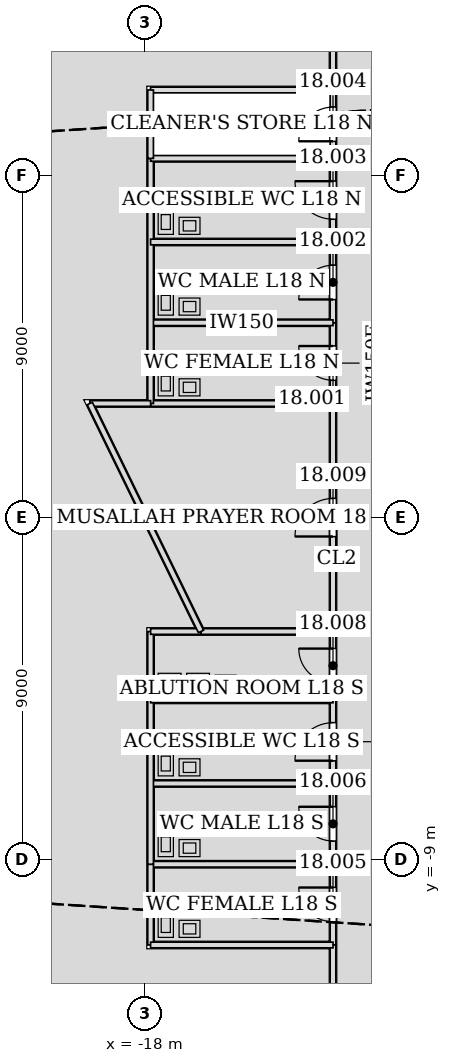
"""IFC4 building model, lengths in metres.
Left out: names, types, materials, properties, quantities, classifications, styles, units other than length and angle.
Written with IfcOpenShell. Run it as: python <this file> out.ifc"""

import sys

from ifc_helpers import new_model, si_unit, direction, frame, frame_2d, origin, place, context, subcontext, project, spatial, rectangle, extrude, element, fill, save


model = new_model("IFC4")
c1 = context("Model", 3, precision=1e-05, world=origin(), true_north=direction((0.0, 1.0)))
c2 = subcontext(c1, "Body", "Model", "MODEL_VIEW")
j1 = project(units=[si_unit("LENGTHUNIT", "METRE"), si_unit("PLANEANGLEUNIT", "RADIAN")], contexts=[c1])
p1 = place(None, origin())
s1 = spatial("IfcSite", under=j1, at=p1, CompositionType="ELEMENT")
p2 = place(p1, origin())
s2 = spatial("IfcBuilding", under=s1, at=p2, CompositionType="ELEMENT")
p3 = place(p2, frame((0.0, 0.0, 83.4)))
s3 = spatial("IfcBuildingStorey", under=s2, at=p3, CompositionType="ELEMENT", Elevation=83.4)
p4 = place(p3, frame((-13.05, 5.126, 0.0), z_axis=(0.0, 0.0, 1.0), x_axis=(0.0, -1.0, 0.0)))
e1 = element("IfcWall", 1, at=p4, inside=s3, PredefinedType="PARTITIONING", context=c2, shape_type="SweptSolid", body=[
    extrude(rectangle(XDim=2.127, YDim=0.15, at=frame_2d((1.063, 0.0))), origin(), (0.0, 0.0, 1.0), 4.035),
])
p5 = place(p4, frame((0.614, 0.0, 0.0)))
e2 = element("IfcOpeningElement", 2, at=p5, cuts=e1, PredefinedType="OPENING", context=c2, shape_type="SweptSolid", body=[
    extrude(rectangle(XDim=0.9, YDim=2.1, at=frame_2d((0.45, 1.05))), frame((0.0, 0.085, 0.0), z_axis=(0.0, -1.0, 0.0), x_axis=(1.0, 0.0, 0.0)), (0.0, 0.0, 1.0), 0.17),
])
p6 = place(p3, frame((-13.05, 7.251, 0.0), z_axis=(0.0, 0.0, 1.0), x_axis=(0.0, -1.0, 0.0)))
e3 = element("IfcWall", 3, at=p6, inside=s3, PredefinedType="PARTITIONING", context=c2, shape_type="SweptSolid", body=[
    extrude(rectangle(XDim=2.127, YDim=0.15, at=frame_2d((1.063, 0.0))), origin(), (0.0, 0.0, 1.0), 4.035),
])
p7 = place(p6, frame((0.614, 0.0, 0.0)))
e4 = element("IfcOpeningElement", 4, at=p7, cuts=e3, PredefinedType="OPENING", context=c2, shape_type="SweptSolid", body=[
    extrude(rectangle(XDim=0.9, YDim=2.1, at=frame_2d((0.45, 1.05))), frame((0.0, 0.085, 0.0), z_axis=(0.0, -1.0, 0.0), x_axis=(1.0, 0.0, 0.0)), (0.0, 0.0, 1.0), 0.17),
])
p8 = place(p3, frame((-13.05, 9.451, 0.0), z_axis=(0.0, 0.0, 1.0), x_axis=(0.0, -1.0, 0.0)))
e5 = element("IfcWall", 5, at=p8, inside=s3, PredefinedType="PARTITIONING", context=c2, shape_type="SweptSolid", body=[
    extrude(rectangle(XDim=2.202, YDim=0.15, at=frame_2d((1.101, 0.0))), origin(), (0.0, 0.0, 1.0), 4.035),
])
p9 = place(p8, frame((0.601, 0.0, 0.0)))
e6 = element("IfcOpeningElement", 6, at=p9, cuts=e5, PredefinedType="OPENING", context=c2, shape_type="SweptSolid", body=[
    extrude(rectangle(XDim=1.0, YDim=2.1, at=frame_2d((0.5, 1.05))), frame((0.0, 0.085, 0.0), z_axis=(0.0, -1.0, 0.0), x_axis=(1.0, 0.0, 0.0)), (0.0, 0.0, 1.0), 0.17),
])
p10 = place(p3, frame((-13.05, 11.251, 0.0), z_axis=(0.0, 0.0, 1.0), x_axis=(0.0, -1.0, 0.0)))
e7 = element("IfcWall", 7, at=p10, inside=s3, PredefinedType="PARTITIONING", context=c2, shape_type="SweptSolid", body=[
    extrude(rectangle(XDim=1.802, YDim=0.15, at=frame_2d((0.901, 0.0))), origin(), (0.0, 0.0, 1.0), 3.014),
])
p11 = place(p10, frame((0.451, 0.0, 0.0)))
e8 = element("IfcOpeningElement", 8, at=p11, cuts=e7, PredefinedType="OPENING", context=c2, shape_type="SweptSolid", body=[
    extrude(rectangle(XDim=0.9, YDim=2.1, at=frame_2d((0.45, 1.05))), frame((0.0, 0.085, 0.0), z_axis=(0.0, -1.0, 0.0), x_axis=(1.0, 0.0, 0.0)), (0.0, 0.0, 1.0), 0.17),
])
p12 = place(p3, frame((-13.05, -9.124, 0.0), z_axis=(0.0, 0.0, 1.0), x_axis=(0.0, -1.0, 0.0)))
e9 = element("IfcWall", 9, at=p12, inside=s3, PredefinedType="PARTITIONING", context=c2, shape_type="SweptSolid", body=[
    extrude(rectangle(XDim=2.127, YDim=0.15, at=frame_2d((1.063, 0.0))), origin(), (0.0, 0.0, 1.0), 3.014),
])
p13 = place(p12, frame((0.614, 0.0, 0.0)))
e10 = element("IfcOpeningElement", 10, at=p13, cuts=e9, PredefinedType="OPENING", context=c2, shape_type="SweptSolid", body=[
    extrude(rectangle(XDim=0.9, YDim=2.1, at=frame_2d((0.45, 1.05))), frame((0.0, 0.085, 0.0), z_axis=(0.0, -1.0, 0.0), x_axis=(1.0, 0.0, 0.0)), (0.0, 0.0, 1.0), 0.17),
])
p14 = place(p3, frame((-13.05, -6.999, 0.0), z_axis=(0.0, 0.0, 1.0), x_axis=(0.0, -1.0, 0.0)))
e11 = element("IfcWall", 11, at=p14, inside=s3, PredefinedType="PARTITIONING", context=c2, shape_type="SweptSolid", body=[
    extrude(rectangle(XDim=2.127, YDim=0.15, at=frame_2d((1.063, 0.0))), origin(), (0.0, 0.0, 1.0), 4.035),
])
p15 = place(p14, frame((0.614, 0.0, 0.0)))
e12 = element("IfcOpeningElement", 12, at=p15, cuts=e11, PredefinedType="OPENING", context=c2, shape_type="SweptSolid", body=[
    extrude(rectangle(XDim=0.9, YDim=2.1, at=frame_2d((0.45, 1.05))), frame((0.0, 0.085, 0.0), z_axis=(0.0, -1.0, 0.0), x_axis=(1.0, 0.0, 0.0)), (0.0, 0.0, 1.0), 0.17),
])
p16 = place(p3, frame((-13.05, -4.799, 0.0), z_axis=(0.0, 0.0, 1.0), x_axis=(0.0, -1.0, 0.0)))
e13 = element("IfcWall", 13, at=p16, inside=s3, PredefinedType="PARTITIONING", context=c2, shape_type="SweptSolid", body=[
    extrude(rectangle(XDim=2.202, YDim=0.15, at=frame_2d((1.101, 0.0))), origin(), (0.0, 0.0, 1.0), 4.035),
])
p17 = place(p16, frame((0.601, 0.0, 0.0)))
e14 = element("IfcOpeningElement", 14, at=p17, cuts=e13, PredefinedType="OPENING", context=c2, shape_type="SweptSolid", body=[
    extrude(rectangle(XDim=1.0, YDim=2.1, at=frame_2d((0.5, 1.05))), frame((0.0, 0.085, 0.0), z_axis=(0.0, -1.0, 0.0), x_axis=(1.0, 0.0, 0.0)), (0.0, 0.0, 1.0), 0.17),
])
p18 = place(p3, frame((-13.05, -2.999, 0.0), z_axis=(0.0, 0.0, 1.0), x_axis=(0.0, -1.0, 0.0)))
e15 = element("IfcWall", 15, at=p18, inside=s3, PredefinedType="PARTITIONING", context=c2, shape_type="SweptSolid", body=[
    extrude(rectangle(XDim=1.802, YDim=0.15, at=frame_2d((0.901, 0.0))), origin(), (0.0, 0.0, 1.0), 4.035),
])
p19 = place(p18, frame((0.451, 0.0, 0.0)))
e16 = element("IfcOpeningElement", 16, at=p19, cuts=e15, PredefinedType="OPENING", context=c2, shape_type="SweptSolid", body=[
    extrude(rectangle(XDim=0.9, YDim=2.1, at=frame_2d((0.45, 1.05))), frame((0.0, 0.085, 0.0), z_axis=(0.0, -1.0, 0.0), x_axis=(1.0, 0.0, 0.0)), (0.0, 0.0, 1.0), 0.17),
])
p20 = place(p3, frame((-13.05, 3.001, 0.0), z_axis=(0.0, 0.0, 1.0), x_axis=(0.0, -1.0, 0.0)))
e17 = element("IfcWall", 17, at=p20, inside=s3, PredefinedType="PARTITIONING", context=c2, shape_type="SweptSolid", body=[
    extrude(rectangle(XDim=6.002, YDim=0.15, at=frame_2d((3.001, 0.0))), origin(), (0.0, 0.0, 1.0), 3.065),
])
p21 = place(p20, frame((2.501, 0.0, 0.0)))
e18 = element("IfcOpeningElement", 18, at=p21, cuts=e17, PredefinedType="OPENING", context=c2, shape_type="SweptSolid", body=[
    extrude(rectangle(XDim=1.0, YDim=2.1, at=frame_2d((0.5, 1.05))), frame((0.0, 0.085, 0.0), z_axis=(0.0, -1.0, 0.0), x_axis=(1.0, 0.0, 0.0)), (0.0, 0.0, 1.0), 0.17),
])
for number, where, z_axis, x_axis in (
    (19, (-13.05, -11.249, 0.0), (0.0, 0.0, 1.0), (0.0, -1.0, 0.0)),
    (20, (-13.05, 13.05, 0.0), (0.0, 0.0, 1.0), (0.0, -1.0, 0.0)),
):
    element("IfcWall", number, at=place(p3, frame(where, z_axis=z_axis, x_axis=x_axis)), inside=s3, PredefinedType="PARTITIONING", context=c2, shape_type="SweptSolid", body=[
        extrude(rectangle(XDim=1.801, YDim=0.15, at=frame_2d((0.9, 0.0))), origin(), (0.0, 0.0, 1.0), 3.113),
    ])
for number, where, z_axis, x_axis in (
    (21, (-13.05, 5.125, 0.0), (0.0, 0.0, 1.0), (-1.0, 0.0, 0.0)),
    (22, (-17.85, 3.0, 0.0), (0.0, 0.0, 1.0), (1.0, 0.0, 0.0)),
):
    element("IfcWall", number, at=place(p3, frame(where, z_axis=z_axis, x_axis=x_axis)), inside=s3, PredefinedType="PARTITIONING", context=c2, shape_type="SweptSolid", body=[
        extrude(rectangle(XDim=4.8, YDim=0.15, at=frame_2d((2.4, 0.0))), origin(), (0.0, 0.0, 1.0), 3.492),
    ])
p22 = place(p3, frame((-17.85, 3.0, 0.0), z_axis=(0.0, 0.0, 1.0), x_axis=(0.0, 1.0, 0.0)))
e23 = element("IfcWall", 23, at=p22, inside=s3, PredefinedType="PARTITIONING", context=c2, shape_type="SweptSolid", body=[
    extrude(rectangle(XDim=6.45, YDim=0.15, at=frame_2d((3.225, 0.0))), origin(), (0.0, 0.0, 1.0), 4.035),
])
for number, where, z_axis, x_axis in (
    (24, (-13.05, 7.25, 0.0), (0.0, 0.0, 1.0), (-1.0, 0.0, 0.0)),
    (25, (-13.05, 9.45, 0.0), (0.0, 0.0, 1.0), (-1.0, 0.0, 0.0)),
):
    element("IfcWall", number, at=place(p3, frame(where, z_axis=z_axis, x_axis=x_axis)), inside=s3, PredefinedType="PARTITIONING", context=c2, shape_type="SweptSolid", body=[
        extrude(rectangle(XDim=4.8, YDim=0.15, at=frame_2d((2.4, 0.0))), origin(), (0.0, 0.0, 1.0), 3.492),
    ])
p23 = place(p3, frame((-13.05, 11.25, 0.0), z_axis=(0.0, 0.0, 1.0), x_axis=(-1.0, 0.0, 0.0)))
e26 = element("IfcWall", 26, at=p23, inside=s3, PredefinedType="PARTITIONING", context=c2, shape_type="SweptSolid", body=[
    extrude(rectangle(XDim=4.8, YDim=0.15, at=frame_2d((2.4, 0.0))), origin(), (0.0, 0.0, 1.0), 3.715),
])
p24 = place(p3, frame((-17.85, 11.25, 0.0), z_axis=(0.0, 0.0, 1.0), x_axis=(0.0, -1.0, 0.0)))
e27 = element("IfcWall", 27, at=p24, inside=s3, PredefinedType="PARTITIONING", context=c2, shape_type="SweptSolid", body=[
    extrude(rectangle(XDim=1.8, YDim=0.15, at=frame_2d((0.9, 0.0))), origin(), (0.0, 0.0, 1.0), 3.014),
])
p25 = place(p3, frame((-13.05, -9.125, 0.0), z_axis=(0.0, 0.0, 1.0), x_axis=(-1.0, 0.0, 0.0)))
e28 = element("IfcWall", 28, at=p25, inside=s3, PredefinedType="PARTITIONING", context=c2, shape_type="SweptSolid", body=[
    extrude(rectangle(XDim=4.8, YDim=0.15, at=frame_2d((2.4, 0.0))), origin(), (0.0, 0.0, 1.0), 3.492),
])
p26 = place(p3, frame((-17.85, -9.125, 0.0), z_axis=(0.0, 0.0, 1.0), x_axis=(0.0, -1.0, 0.0)))
e29 = element("IfcWall", 29, at=p26, inside=s3, PredefinedType="PARTITIONING", context=c2, shape_type="SweptSolid", body=[
    extrude(rectangle(XDim=2.125, YDim=0.15, at=frame_2d((1.062, 0.0))), origin(), (0.0, 0.0, 1.0), 3.014),
])
p27 = place(p3, frame((-17.85, -11.25, 0.0), z_axis=(0.0, 0.0, 1.0), x_axis=(1.0, 0.0, 0.0)))
e30 = element("IfcWall", 30, at=p27, inside=s3, PredefinedType="PARTITIONING", context=c2, shape_type="SweptSolid", body=[
    extrude(rectangle(XDim=4.8, YDim=0.15, at=frame_2d((2.4, 0.0))), origin(), (0.0, 0.0, 1.0), 3.715),
])
p28 = place(p3, frame((-13.05, -7.0, 0.0), z_axis=(0.0, 0.0, 1.0), x_axis=(-1.0, 0.0, 0.0)))
e31 = element("IfcWall", 31, at=p28, inside=s3, PredefinedType="PARTITIONING", context=c2, shape_type="SweptSolid", body=[
    extrude(rectangle(XDim=4.8, YDim=0.15, at=frame_2d((2.4, 0.0))), origin(), (0.0, 0.0, 1.0), 3.492),
])
p29 = place(p3, frame((-17.85, -9.125, 0.0), z_axis=(0.0, 0.0, 1.0), x_axis=(0.0, 1.0, 0.0)))
e32 = element("IfcWall", 32, at=p29, inside=s3, PredefinedType="PARTITIONING", context=c2, shape_type="SweptSolid", body=[
    extrude(rectangle(XDim=6.125, YDim=0.15, at=frame_2d((3.062, 0.0))), origin(), (0.0, 0.0, 1.0), 4.035),
])
p30 = place(p3, frame((-13.05, -4.8, 0.0), z_axis=(0.0, 0.0, 1.0), x_axis=(-1.0, 0.0, 0.0)))
e33 = element("IfcWall", 33, at=p30, inside=s3, PredefinedType="PARTITIONING", context=c2, shape_type="SweptSolid", body=[
    extrude(rectangle(XDim=4.8, YDim=0.15, at=frame_2d((2.4, 0.0))), origin(), (0.0, 0.0, 1.0), 3.492),
])
p31 = place(p3, frame((-13.05, -3.0, 0.0), z_axis=(0.0, 0.0, 1.0), x_axis=(-1.0, 0.0, 0.0)))
e34 = element("IfcWall", 34, at=p31, inside=s3, PredefinedType="PARTITIONING", context=c2, shape_type="SweptSolid", body=[
    extrude(rectangle(XDim=3.475, YDim=0.15, at=frame_2d((1.737, 0.0))), origin(), (0.0, 0.0, 1.0), 3.492),
])
p32 = place(p3, frame((-16.522, -3.0, 0.0), z_axis=(0.0, 0.0, 1.0), x_axis=(-1.0, 0.0, 0.0)))
e35 = element("IfcWall", 35, at=p32, inside=s3, PredefinedType="PARTITIONING", context=c2, shape_type="SweptSolid", body=[
    extrude(rectangle(XDim=1.328, YDim=0.15, at=frame_2d((0.664, 0.0))), origin(), (0.0, 0.0, 1.0), 4.035),
])
p33 = place(p3, frame((-17.849, 3.0, 0.0), z_axis=(0.0, 0.0, 1.0), x_axis=(-1.0, 0.0, 0.0)))
e36 = element("IfcWall", 36, at=p33, inside=s3, PredefinedType="PARTITIONING", context=c2, shape_type="SweptSolid", body=[
    extrude(rectangle(XDim=1.601, YDim=0.15, at=frame_2d((0.8, 0.0))), origin(), (0.0, 0.0, 1.0), 3.497),
])
p34 = place(p3, frame((-19.45, 3.0, 0.0), z_axis=(0.0, 0.0, 1.0), x_axis=(0.43835589904, -0.898801482963, 0.0)))
e37 = element("IfcWall", 37, at=p34, inside=s3, PredefinedType="PARTITIONING", context=c2, shape_type="SweptSolid", body=[
    extrude(rectangle(XDim=6.676, YDim=0.15, at=frame_2d((3.338, 0.0))), origin(), (0.0, 0.0, 1.0), 3.065),
])
p35 = place(p5, frame((0.9, 0.0, 0.0), z_axis=(0.0, 0.0, 1.0), x_axis=(-1.0, 0.0, 0.0)))
e38 = element("IfcDoor", 38, at=p35, inside=s3, OperationType="SINGLE_SWING_RIGHT", PredefinedType="DOOR", context=c2, shape_type="SweptSolid", body=[
    extrude(rectangle(XDim=0.9, YDim=2.1, at=frame_2d((0.45, 1.05))), frame((0.0, 0.025, 0.0), z_axis=(0.0, -1.0, 0.0), x_axis=(1.0, 0.0, 0.0)), (0.0, 0.0, 1.0), 0.05),
])
fill(e2, e38)
p36 = place(p7, frame((0.9, 0.0, 0.0), z_axis=(0.0, 0.0, 1.0), x_axis=(-1.0, 0.0, 0.0)))
e39 = element("IfcDoor", 39, at=p36, inside=s3, OperationType="SINGLE_SWING_LEFT", PredefinedType="DOOR", context=c2, shape_type="SweptSolid", body=[
    extrude(rectangle(XDim=0.9, YDim=2.1, at=frame_2d((0.45, 1.05))), frame((0.0, 0.025, 0.0), z_axis=(0.0, -1.0, 0.0), x_axis=(1.0, 0.0, 0.0)), (0.0, 0.0, 1.0), 0.05),
])
fill(e4, e39)
p37 = place(p9, frame((1.0, 0.0, 0.0), z_axis=(0.0, 0.0, 1.0), x_axis=(-1.0, 0.0, 0.0)))
e40 = element("IfcDoor", 40, at=p37, inside=s3, OperationType="SINGLE_SWING_RIGHT", PredefinedType="DOOR", context=c2, shape_type="SweptSolid", body=[
    extrude(rectangle(XDim=1.0, YDim=2.1, at=frame_2d((0.5, 1.05))), frame((0.0, 0.025, 0.0), z_axis=(0.0, -1.0, 0.0), x_axis=(1.0, 0.0, 0.0)), (0.0, 0.0, 1.0), 0.05),
])
fill(e6, e40)
p38 = place(p11, frame((0.9, 0.0, 0.0), z_axis=(0.0, 0.0, 1.0), x_axis=(-1.0, 0.0, 0.0)))
e41 = element("IfcDoor", 41, at=p38, inside=s3, OperationType="SINGLE_SWING_LEFT", PredefinedType="DOOR", context=c2, shape_type="SweptSolid", body=[
    extrude(rectangle(XDim=0.9, YDim=2.1, at=frame_2d((0.45, 1.05))), frame((0.0, 0.025, 0.0), z_axis=(0.0, -1.0, 0.0), x_axis=(1.0, 0.0, 0.0)), (0.0, 0.0, 1.0), 0.05),
])
fill(e8, e41)
p39 = place(p13, frame((0.9, 0.0, 0.0), z_axis=(0.0, 0.0, 1.0), x_axis=(-1.0, 0.0, 0.0)))
e42 = element("IfcDoor", 42, at=p39, inside=s3, OperationType="SINGLE_SWING_RIGHT", PredefinedType="DOOR", context=c2, shape_type="SweptSolid", body=[
    extrude(rectangle(XDim=0.9, YDim=2.1, at=frame_2d((0.45, 1.05))), frame((0.0, 0.025, 0.0), z_axis=(0.0, -1.0, 0.0), x_axis=(1.0, 0.0, 0.0)), (0.0, 0.0, 1.0), 0.05),
])
fill(e10, e42)
p40 = place(p15, frame((0.9, 0.0, 0.0), z_axis=(0.0, 0.0, 1.0), x_axis=(-1.0, 0.0, 0.0)))
e43 = element("IfcDoor", 43, at=p40, inside=s3, OperationType="SINGLE_SWING_RIGHT", PredefinedType="DOOR", context=c2, shape_type="SweptSolid", body=[
    extrude(rectangle(XDim=0.9, YDim=2.1, at=frame_2d((0.45, 1.05))), frame((0.0, 0.025, 0.0), z_axis=(0.0, -1.0, 0.0), x_axis=(1.0, 0.0, 0.0)), (0.0, 0.0, 1.0), 0.05),
])
fill(e12, e43)
p41 = place(p17, frame((1.0, 0.0, 0.0), z_axis=(0.0, 0.0, 1.0), x_axis=(-1.0, 0.0, 0.0)))
e44 = element("IfcDoor", 44, at=p41, inside=s3, OperationType="SINGLE_SWING_LEFT", PredefinedType="DOOR", context=c2, shape_type="SweptSolid", body=[
    extrude(rectangle(XDim=1.0, YDim=2.1, at=frame_2d((0.5, 1.05))), frame((0.0, 0.025, 0.0), z_axis=(0.0, -1.0, 0.0), x_axis=(1.0, 0.0, 0.0)), (0.0, 0.0, 1.0), 0.05),
])
fill(e14, e44)
p42 = place(p19, frame((0.9, 0.0, 0.0), z_axis=(0.0, 0.0, 1.0), x_axis=(-1.0, 0.0, 0.0)))
e45 = element("IfcDoor", 45, at=p42, inside=s3, OperationType="SINGLE_SWING_RIGHT", PredefinedType="DOOR", context=c2, shape_type="SweptSolid", body=[
    extrude(rectangle(XDim=0.9, YDim=2.1, at=frame_2d((0.45, 1.05))), frame((0.0, 0.025, 0.0), z_axis=(0.0, -1.0, 0.0), x_axis=(1.0, 0.0, 0.0)), (0.0, 0.0, 1.0), 0.05),
])
fill(e16, e45)
p43 = place(p21, frame((1.0, 0.0, 0.0), z_axis=(0.0, 0.0, 1.0), x_axis=(-1.0, 0.0, 0.0)))
e46 = element("IfcDoor", 46, at=p43, inside=s3, OperationType="SINGLE_SWING_LEFT", PredefinedType="DOOR", context=c2, shape_type="SweptSolid", body=[
    extrude(rectangle(XDim=1.0, YDim=2.1, at=frame_2d((0.5, 1.05))), frame((0.0, 0.025, 0.0), z_axis=(0.0, -1.0, 0.0), x_axis=(1.0, 0.0, 0.0)), (0.0, 0.0, 1.0), 0.05),
])
fill(e18, e46)
save(model, sys.argv[1])
